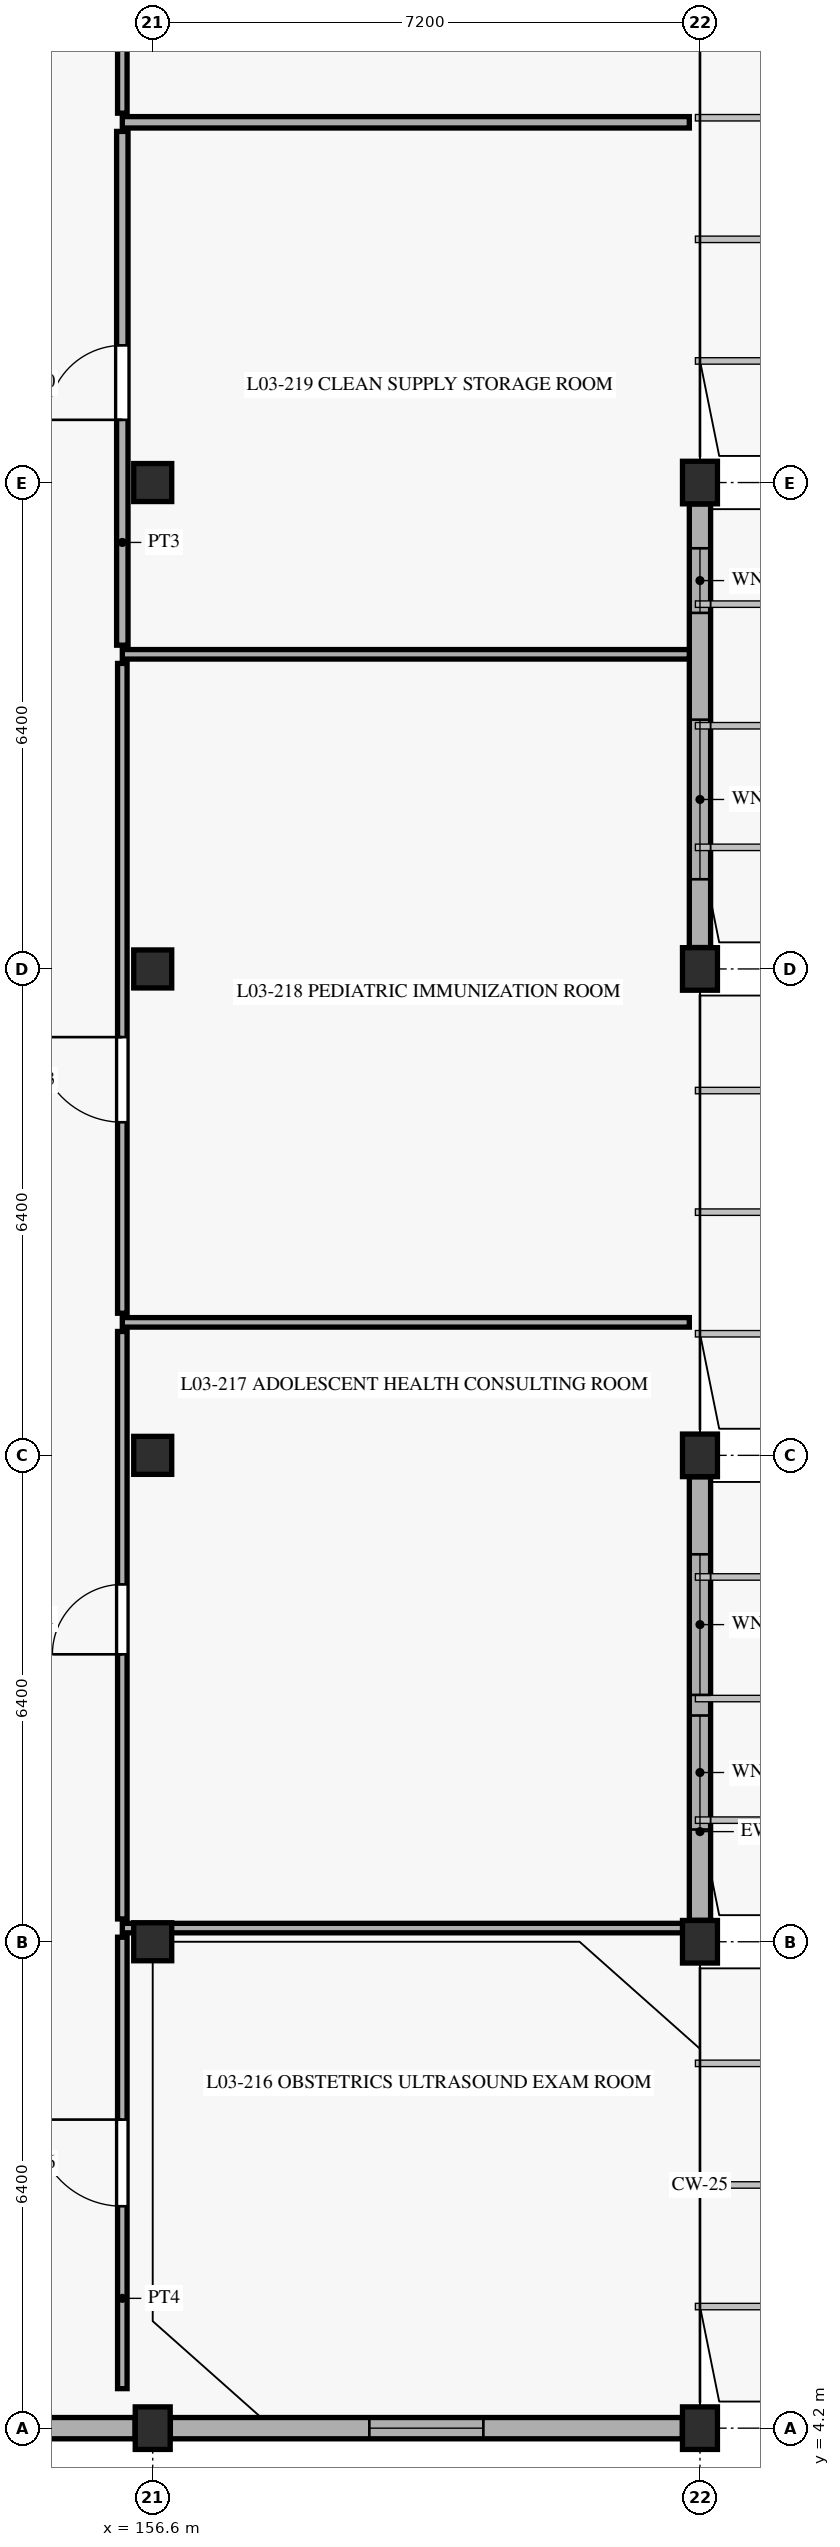
"""IFC4 building model, lengths in metres.
Left out: names, types, materials, properties, quantities, classifications, styles, units other than length and angle.
Written with IfcOpenShell. Run it as: python <this file> out.ifc"""

import sys

from ifc_helpers import new_model, si_unit, direction, frame, frame_2d, origin, origin_with_axes, origin_2d, place, context, subcontext, project, spatial, rectangle, extrude, element, fill, save


model = new_model("IFC4")
c1 = context("Model", 3, precision=1e-05, world=origin(), true_north=direction((0.0, 1.0)))
c2 = subcontext(c1, "Body", "Model", "MODEL_VIEW")
j1 = project(units=[si_unit("LENGTHUNIT", "METRE"), si_unit("PLANEANGLEUNIT", "RADIAN")], contexts=[c1])
p1 = place(None, origin())
s1 = spatial("IfcSite", under=j1, at=p1, CompositionType="ELEMENT")
p2 = place(p1, origin())
s2 = spatial("IfcBuilding", under=s1, at=p2, CompositionType="ELEMENT")
p3 = place(p2, frame((0.0, 0.0, 9.3)))
s3 = spatial("IfcBuildingStorey", under=s2, at=p3, CompositionType="ELEMENT", Elevation=9.3)
p4 = place(p3, frame((156.6, 4.2, 0.0), z_axis=(0.0, 0.0, 1.0), x_axis=(1.0, 0.0, 0.0)))
e1 = element("IfcColumn", 1, at=p4, inside=s3, PredefinedType="COLUMN", context=c2, shape_type="SweptSolid", body=[
    extrude(rectangle(XDim=0.46, YDim=0.56, at=origin_2d()), origin(), (0.0, 0.0, 1.0), 4.2),
])
for number, where, z_axis, x_axis in (
    (2, (156.6, 10.6, 0.0), (0.0, 0.0, 1.0), (1.0, 0.0, 0.0)),
    (3, (156.6, 17.0, 0.0), (0.0, 0.0, 1.0), (1.0, 0.0, 0.0)),
    (4, (156.6, 23.4, 0.0), (0.0, 0.0, 1.0), (1.0, 0.0, 0.0)),
    (5, (156.6, 29.8, 0.0), (0.0, 0.0, 1.0), (1.0, 0.0, 0.0)),
):
    element("IfcColumn", number, at=place(p3, frame(where, z_axis=z_axis, x_axis=x_axis)), inside=s3, PredefinedType="COLUMN", context=c2, shape_type="SweptSolid", body=[
        extrude(rectangle(XDim=0.5, YDim=0.5, at=origin_2d()), origin(), (0.0, 0.0, 1.0), 4.2),
    ])
for number, where, z_axis, x_axis in (
    (6, (163.8, 4.2, 0.0), (0.0, 0.0, 1.0), (1.0, 0.0, 0.0)),
    (7, (163.8, 10.6, 0.0), (0.0, 0.0, 1.0), (1.0, 0.0, 0.0)),
    (8, (163.8, 17.0, 0.0), (0.0, 0.0, 1.0), (1.0, 0.0, 0.0)),
    (9, (163.8, 23.4, 0.0), (0.0, 0.0, 1.0), (1.0, 0.0, 0.0)),
    (10, (163.8, 29.8, 0.0), (0.0, 0.0, 1.0), (1.0, 0.0, 0.0)),
):
    element("IfcColumn", number, at=place(p3, frame(where, z_axis=z_axis, x_axis=x_axis)), inside=s3, PredefinedType="COLUMN", context=c2, shape_type="SweptSolid", body=[
        extrude(rectangle(XDim=0.46, YDim=0.56, at=origin_2d()), origin(), (0.0, 0.0, 1.0), 4.2),
    ])
p5 = place(p3, frame((163.8, 10.882, 0.0), z_axis=(0.0, 0.0, 1.0), x_axis=(0.0, 1.0, 0.0)))
e11 = element("IfcWall", 11, at=p5, inside=s3, PredefinedType="SOLIDWALL", context=c2, shape_type="SweptSolid", body=[
    extrude(rectangle(XDim=5.836, YDim=0.28, at=frame_2d((2.918, 0.0))), origin(), (0.0, 0.0, 1.0), 3.48),
])
p6 = place(p5, frame((1.195, 0.0, 0.88)))
e12 = element("IfcOpeningElement", 12, at=p6, cuts=e11, PredefinedType="OPENING", context=c2, shape_type="SweptSolid", body=[
    extrude(rectangle(XDim=1.5, YDim=2.2, at=frame_2d((0.75, 1.1))), frame((0.0, 0.15, 0.0), z_axis=(0.0, -1.0, 0.0), x_axis=(1.0, 0.0, 0.0)), (0.0, 0.0, 1.0), 0.3),
])
p7 = place(p5, frame((2.966, 0.0, 0.88)))
e13 = element("IfcOpeningElement", 13, at=p7, cuts=e11, PredefinedType="OPENING", context=c2, shape_type="SweptSolid", body=[
    extrude(rectangle(XDim=1.85, YDim=1.65, at=frame_2d((0.925, 0.825))), frame((0.0, 0.15, 0.0), z_axis=(0.0, -1.0, 0.0), x_axis=(1.0, 0.0, 0.0)), (0.0, 0.0, 1.0), 0.3),
])
p8 = place(p3, frame((163.8, 23.682, 0.0), z_axis=(0.0, 0.0, 1.0), x_axis=(0.0, 1.0, 0.0)))
e14 = element("IfcWall", 14, at=p8, inside=s3, PredefinedType="SOLIDWALL", context=c2, shape_type="SweptSolid", body=[
    extrude(rectangle(XDim=5.836, YDim=0.28, at=frame_2d((2.918, 0.0))), origin(), (0.0, 0.0, 1.0), 3.48),
])
p9 = place(p8, frame((0.898, 0.0, 0.88)))
e15 = element("IfcOpeningElement", 15, at=p9, cuts=e14, PredefinedType="OPENING", context=c2, shape_type="SweptSolid", body=[
    extrude(rectangle(XDim=2.1, YDim=2.2, at=frame_2d((1.05, 1.1))), frame((0.0, 0.15, 0.0), z_axis=(0.0, -1.0, 0.0), x_axis=(1.0, 0.0, 0.0)), (0.0, 0.0, 1.0), 0.3),
])
p10 = place(p8, frame((4.403, 0.0, 0.88)))
e16 = element("IfcOpeningElement", 16, at=p10, cuts=e14, PredefinedType="OPENING", context=c2, shape_type="SweptSolid", body=[
    extrude(rectangle(XDim=0.85, YDim=2.1, at=frame_2d((0.425, 1.05))), frame((0.0, 0.15, 0.0), z_axis=(0.0, -1.0, 0.0), x_axis=(1.0, 0.0, 0.0)), (0.0, 0.0, 1.0), 0.3),
])
p11 = place(p3, frame((149.032, 4.2, 0.0), z_axis=(0.0, 0.0, 1.0), x_axis=(1.0, 0.0, 0.0)))
e17 = element("IfcWall", 17, at=p11, inside=s3, PredefinedType="SOLIDWALL", context=c2, shape_type="SweptSolid", body=[
    extrude(rectangle(XDim=7.336, YDim=0.28, at=frame_2d((3.668, 0.0))), origin(), (0.0, 0.0, 1.0), 3.4),
])
p12 = place(p11, frame((2.918, 0.0, 0.9)))
e18 = element("IfcOpeningElement", 18, at=p12, cuts=e17, PredefinedType="OPENING", context=c2, shape_type="SweptSolid", body=[
    extrude(rectangle(XDim=1.5, YDim=2.2, at=frame_2d((0.75, 1.1))), frame((0.0, 0.15, 0.0), z_axis=(0.0, -1.0, 0.0), x_axis=(1.0, 0.0, 0.0)), (0.0, 0.0, 1.0), 0.3),
])
p13 = place(p3, frame((156.832, 4.2, 0.0), z_axis=(0.0, 0.0, 1.0), x_axis=(1.0, 0.0, 0.0)))
e19 = element("IfcWall", 19, at=p13, inside=s3, PredefinedType="SOLIDWALL", context=c2, shape_type="SweptSolid", body=[
    extrude(rectangle(XDim=6.736, YDim=0.28, at=frame_2d((3.368, 0.0))), origin(), (0.0, 0.0, 1.0), 3.4),
])
p14 = place(p13, frame((2.618, 0.0, 0.9)))
e20 = element("IfcOpeningElement", 20, at=p14, cuts=e19, PredefinedType="OPENING", context=c2, shape_type="SweptSolid", body=[
    extrude(rectangle(XDim=1.5, YDim=2.2, at=frame_2d((0.75, 1.1))), frame((0.0, 0.15, 0.0), z_axis=(0.0, -1.0, 0.0), x_axis=(1.0, 0.0, 0.0)), (0.0, 0.0, 1.0), 0.3),
])
p15 = place(p3, frame((156.2, 4.72, 0.0), z_axis=(0.0, 0.0, 1.0), x_axis=(0.0, 1.0, 0.0)))
e21 = element("IfcWall", 21, at=p15, inside=s3, PredefinedType="PARTITIONING", context=c2, shape_type="SweptSolid", body=[
    extrude(rectangle(XDim=5.94, YDim=0.125, at=frame_2d((2.97, 0.0))), origin(), (0.0, 0.0, 1.0), 3.495),
])
p16 = place(p15, frame((2.4, 0.0, 0.0)))
e22 = element("IfcOpeningElement", 22, at=p16, cuts=e21, PredefinedType="OPENING", context=c2, shape_type="SweptSolid", body=[
    extrude(rectangle(XDim=1.14, YDim=2.22, at=frame_2d((0.57, 1.11))), frame((0.0, 0.073, 0.0), z_axis=(0.0, -1.0, 0.0), x_axis=(1.0, 0.0, 0.0)), (0.0, 0.0, 1.0), 0.145),
])
p17 = place(p3, frame((156.2, 10.78, 0.0), z_axis=(0.0, 0.0, 1.0), x_axis=(1.0, 0.0, 0.0)))
e23 = element("IfcWall", 23, at=p17, inside=s3, PredefinedType="PARTITIONING", context=c2, shape_type="SweptSolid", body=[
    extrude(rectangle(XDim=7.46, YDim=0.125, at=frame_2d((3.73, 0.0))), origin(), (0.0, 0.0, 1.0), 3.475),
])
p18 = place(p3, frame((156.2, 10.9, 0.0), z_axis=(0.0, 0.0, 1.0), x_axis=(0.0, 1.0, 0.0)))
e24 = element("IfcWall", 24, at=p18, inside=s3, PredefinedType="PARTITIONING", context=c2, shape_type="SweptSolid", body=[
    extrude(rectangle(XDim=7.73, YDim=0.125, at=frame_2d((3.865, 0.0))), origin(), (0.0, 0.0, 1.0), 3.495),
])
p19 = place(p18, frame((3.482, 0.0, 0.0)))
e25 = element("IfcOpeningElement", 25, at=p19, cuts=e24, PredefinedType="OPENING", context=c2, shape_type="SweptSolid", body=[
    extrude(rectangle(XDim=0.92, YDim=2.15, at=frame_2d((0.46, 1.075))), frame((0.0, 0.073, 0.0), z_axis=(0.0, -1.0, 0.0), x_axis=(1.0, 0.0, 0.0)), (0.0, 0.0, 1.0), 0.145),
])
p20 = place(p3, frame((156.2, 18.75, 0.0), z_axis=(0.0, 0.0, 1.0), x_axis=(1.0, 0.0, 0.0)))
e26 = element("IfcWall", 26, at=p20, inside=s3, PredefinedType="PARTITIONING", context=c2, shape_type="SweptSolid", body=[
    extrude(rectangle(XDim=7.46, YDim=0.125, at=frame_2d((3.73, 0.0))), origin(), (0.0, 0.0, 1.0), 3.475),
])
p21 = place(p3, frame((156.2, 18.87, 0.0), z_axis=(0.0, 0.0, 1.0), x_axis=(0.0, 1.0, 0.0)))
e27 = element("IfcWall", 27, at=p21, inside=s3, PredefinedType="PARTITIONING", context=c2, shape_type="SweptSolid", body=[
    extrude(rectangle(XDim=8.55, YDim=0.125, at=frame_2d((4.275, 0.0))), origin(), (0.0, 0.0, 1.0), 3.245),
])
p22 = place(p21, frame((2.513, 0.0, 0.0)))
e28 = element("IfcOpeningElement", 28, at=p22, cuts=e27, PredefinedType="OPENING", context=c2, shape_type="SweptSolid", body=[
    extrude(rectangle(XDim=1.12, YDim=2.2, at=frame_2d((0.56, 1.1))), frame((0.0, 0.073, 0.0), z_axis=(0.0, -1.0, 0.0), x_axis=(1.0, 0.0, 0.0)), (0.0, 0.0, 1.0), 0.145),
])
p23 = place(p3, frame((156.2, 27.54, 0.0), z_axis=(0.0, 0.0, 1.0), x_axis=(1.0, 0.0, 0.0)))
e29 = element("IfcWall", 29, at=p23, inside=s3, PredefinedType="PARTITIONING", context=c2, shape_type="SweptSolid", body=[
    extrude(rectangle(XDim=7.46, YDim=0.125, at=frame_2d((3.73, 0.0))), origin(), (0.0, 0.0, 1.0), 3.475),
])
p24 = place(p3, frame((156.2, 27.66, 0.0), z_axis=(0.0, 0.0, 1.0), x_axis=(0.0, 1.0, 0.0)))
e30 = element("IfcWall", 30, at=p24, inside=s3, PredefinedType="PARTITIONING", context=c2, shape_type="SweptSolid", body=[
    extrude(rectangle(XDim=6.76, YDim=0.15, at=frame_2d((3.38, 0.0))), origin(), (0.0, 0.0, 1.0), 3.495),
])
p25 = place(p24, frame((2.965, 0.0, 0.0)))
e31 = element("IfcOpeningElement", 31, at=p25, cuts=e30, PredefinedType="OPENING", context=c2, shape_type="SweptSolid", body=[
    extrude(rectangle(XDim=0.98, YDim=2.12, at=frame_2d((0.49, 1.06))), frame((0.0, 0.085, 0.0), z_axis=(0.0, -1.0, 0.0), x_axis=(1.0, 0.0, 0.0)), (0.0, 0.0, 1.0), 0.17),
])
p26 = place(p3, frame((156.2, 34.54, 0.0), z_axis=(0.0, 0.0, 1.0), x_axis=(1.0, 0.0, 0.0)))
e32 = element("IfcWall", 32, at=p26, inside=s3, PredefinedType="PARTITIONING", context=c2, shape_type="SweptSolid", body=[
    extrude(rectangle(XDim=7.46, YDim=0.15, at=frame_2d((3.73, 0.0))), origin(), (0.0, 0.0, 1.0), 3.475),
])
p27 = place(p3, frame((156.2, 34.66, 0.0), z_axis=(0.0, 0.0, 1.0), x_axis=(0.0, 1.0, 0.0)))
e33 = element("IfcWall", 33, at=p27, inside=s3, PredefinedType="PARTITIONING", context=c2, shape_type="SweptSolid", body=[
    extrude(rectangle(XDim=8.1, YDim=0.125, at=frame_2d((4.05, 0.0))), origin(), (0.0, 0.0, 1.0), 3.895),
])
p28 = place(p27, frame((3.6, 0.0, 0.0)))
e34 = element("IfcOpeningElement", 34, at=p28, cuts=e33, PredefinedType="OPENING", context=c2, shape_type="SweptSolid", body=[
    extrude(rectangle(XDim=0.9, YDim=2.12, at=frame_2d((0.45, 1.06))), frame((0.0, 0.073, 0.0), z_axis=(0.0, -1.0, 0.0), x_axis=(1.0, 0.0, 0.0)), (0.0, 0.0, 1.0), 0.145),
])
p29 = place(p6, origin_with_axes())
e35 = element("IfcWindow", 35, at=p29, inside=s3, PartitioningType="SINGLE_PANEL", PredefinedType="WINDOW", context=c2, shape_type="SweptSolid", body=[
    extrude(rectangle(XDim=1.5, YDim=2.2, at=frame_2d((0.75, 1.1))), frame((0.0, 0.03, 0.0), z_axis=(0.0, -1.0, 0.0), x_axis=(1.0, 0.0, 0.0)), (0.0, 0.0, 1.0), 0.06),
])
fill(e12, e35)
p30 = place(p7, origin_with_axes())
e36 = element("IfcWindow", 36, at=p30, inside=s3, PartitioningType="SINGLE_PANEL", PredefinedType="WINDOW", context=c2, shape_type="SweptSolid", body=[
    extrude(rectangle(XDim=1.85, YDim=1.65, at=frame_2d((0.925, 0.825))), frame((0.0, 0.03, 0.0), z_axis=(0.0, -1.0, 0.0), x_axis=(1.0, 0.0, 0.0)), (0.0, 0.0, 1.0), 0.06),
])
fill(e13, e36)
p31 = place(p9, origin_with_axes())
e37 = element("IfcWindow", 37, at=p31, inside=s3, PartitioningType="SINGLE_PANEL", PredefinedType="WINDOW", context=c2, shape_type="SweptSolid", body=[
    extrude(rectangle(XDim=2.1, YDim=2.2, at=frame_2d((1.05, 1.1))), frame((0.0, 0.03, 0.0), z_axis=(0.0, -1.0, 0.0), x_axis=(1.0, 0.0, 0.0)), (0.0, 0.0, 1.0), 0.06),
])
fill(e15, e37)
p32 = place(p10, origin_with_axes())
e38 = element("IfcWindow", 38, at=p32, inside=s3, PartitioningType="SINGLE_PANEL", PredefinedType="WINDOW", context=c2, shape_type="SweptSolid", body=[
    extrude(rectangle(XDim=0.85, YDim=2.1, at=frame_2d((0.425, 1.05))), frame((0.0, 0.03, 0.0), z_axis=(0.0, -1.0, 0.0), x_axis=(1.0, 0.0, 0.0)), (0.0, 0.0, 1.0), 0.06),
])
fill(e16, e38)
p33 = place(p14, origin_with_axes())
e39 = element("IfcWindow", 39, at=p33, inside=s3, PartitioningType="SINGLE_PANEL", PredefinedType="WINDOW", context=c2, shape_type="SweptSolid", body=[
    extrude(rectangle(XDim=1.5, YDim=2.2, at=frame_2d((0.75, 1.1))), frame((0.0, 0.03, 0.0), z_axis=(0.0, -1.0, 0.0), x_axis=(1.0, 0.0, 0.0)), (0.0, 0.0, 1.0), 0.06),
])
fill(e20, e39)
p34 = place(p16, frame((1.14, 0.0, 0.0), z_axis=(0.0, 0.0, 1.0), x_axis=(-1.0, 0.0, 0.0)))
e40 = element("IfcDoor", 40, at=p34, inside=s3, OperationType="SINGLE_SWING_LEFT", PredefinedType="DOOR", context=c2, shape_type="SweptSolid", body=[
    extrude(rectangle(XDim=1.14, YDim=2.22, at=frame_2d((0.57, 1.11))), frame((0.0, 0.025, 0.0), z_axis=(0.0, -1.0, 0.0), x_axis=(1.0, 0.0, 0.0)), (0.0, 0.0, 1.0), 0.05),
])
fill(e22, e40)
p35 = place(p19, frame((0.92, 0.0, 0.0), z_axis=(0.0, 0.0, 1.0), x_axis=(-1.0, 0.0, 0.0)))
e41 = element("IfcDoor", 41, at=p35, inside=s3, OperationType="SINGLE_SWING_RIGHT", PredefinedType="DOOR", context=c2, shape_type="SweptSolid", body=[
    extrude(rectangle(XDim=0.92, YDim=2.15, at=frame_2d((0.46, 1.075))), frame((0.0, 0.025, 0.0), z_axis=(0.0, -1.0, 0.0), x_axis=(1.0, 0.0, 0.0)), (0.0, 0.0, 1.0), 0.05),
])
fill(e25, e41)
p36 = place(p22, frame((1.12, 0.0, 0.0), z_axis=(0.0, 0.0, 1.0), x_axis=(-1.0, 0.0, 0.0)))
e42 = element("IfcDoor", 42, at=p36, inside=s3, OperationType="SINGLE_SWING_LEFT", PredefinedType="DOOR", context=c2, shape_type="SweptSolid", body=[
    extrude(rectangle(XDim=1.12, YDim=2.2, at=frame_2d((0.56, 1.1))), frame((0.0, 0.025, 0.0), z_axis=(0.0, -1.0, 0.0), x_axis=(1.0, 0.0, 0.0)), (0.0, 0.0, 1.0), 0.05),
])
fill(e28, e42)
p37 = place(p25, frame((0.98, 0.0, 0.0), z_axis=(0.0, 0.0, 1.0), x_axis=(-1.0, 0.0, 0.0)))
e43 = element("IfcDoor", 43, at=p37, inside=s3, OperationType="SINGLE_SWING_RIGHT", PredefinedType="DOOR", context=c2, shape_type="SweptSolid", body=[
    extrude(rectangle(XDim=0.98, YDim=2.12, at=frame_2d((0.49, 1.06))), frame((0.0, 0.025, 0.0), z_axis=(0.0, -1.0, 0.0), x_axis=(1.0, 0.0, 0.0)), (0.0, 0.0, 1.0), 0.05),
])
fill(e31, e43)
save(model, sys.argv[1])
